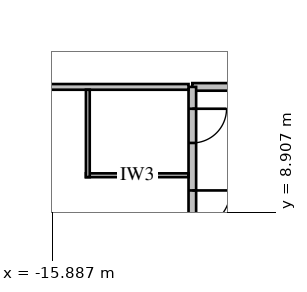
"""IFC4 building model, lengths in metres.
Left out: names, types, materials, properties, quantities, classifications, styles, units other than length and angle.
Written with IfcOpenShell. Run it as: python <this file> out.ifc"""

import sys

from ifc_helpers import new_model, si_unit, direction, frame, frame_2d, origin, place, context, subcontext, project, spatial, rectangle, extrude, element, fill, save


model = new_model("IFC4")
c1 = context("Model", 3, precision=1e-05, world=origin(), true_north=direction((0.0, 1.0)))
c2 = subcontext(c1, "Body", "Model", "MODEL_VIEW")
j1 = project(units=[si_unit("LENGTHUNIT", "METRE"), si_unit("PLANEANGLEUNIT", "RADIAN")], contexts=[c1])
p1 = place(None, origin())
s1 = spatial("IfcSite", under=j1, at=p1, CompositionType="ELEMENT")
p2 = place(p1, origin())
s2 = spatial("IfcBuilding", under=s1, at=p2, CompositionType="ELEMENT")
p3 = place(p2, frame((0.0, 0.0, 6.0)))
s3 = spatial("IfcBuildingStorey", under=s2, at=p3, CompositionType="ELEMENT", Elevation=6.0)
p4 = place(p3, frame((12.2, 12.2, 0.0), z_axis=(0.0, 0.0, 1.0), x_axis=(-1.0, 0.0, 0.0)))
e1 = element("IfcWall", 1, at=p4, inside=s3, PredefinedType="PARTITIONING", context=c2, shape_type="SweptSolid", body=[
    extrude(rectangle(XDim=24.4, YDim=0.2, at=frame_2d((12.2, 0.0))), origin(), (0.0, 0.0, 1.0), 4.188),
])
p5 = place(p4, frame((1.6, 0.0, 0.0)))
e2 = element("IfcOpeningElement", 2, at=p5, cuts=e1, PredefinedType="OPENING", context=c2, shape_type="SweptSolid", body=[
    extrude(rectangle(XDim=1.0, YDim=2.1, at=frame_2d((0.5, 1.05))), frame((0.0, 0.12, 0.0), z_axis=(0.0, -1.0, 0.0), x_axis=(1.0, 0.0, 0.0)), (0.0, 0.0, 1.0), 0.24),
])
p6 = place(p4, frame((5.408, 0.0, 0.0)))
e3 = element("IfcOpeningElement", 3, at=p6, cuts=e1, PredefinedType="OPENING", context=c2, shape_type="SweptSolid", body=[
    extrude(rectangle(XDim=1.0, YDim=2.1, at=frame_2d((0.5, 1.05))), frame((0.0, 0.12, 0.0), z_axis=(0.0, -1.0, 0.0), x_axis=(1.0, 0.0, 0.0)), (0.0, 0.0, 1.0), 0.24),
])
p7 = place(p4, frame((9.408, 0.0, 0.0)))
e4 = element("IfcOpeningElement", 4, at=p7, cuts=e1, PredefinedType="OPENING", context=c2, shape_type="SweptSolid", body=[
    extrude(rectangle(XDim=1.0, YDim=2.1, at=frame_2d((0.5, 1.05))), frame((0.0, 0.12, 0.0), z_axis=(0.0, -1.0, 0.0), x_axis=(1.0, 0.0, 0.0)), (0.0, 0.0, 1.0), 0.24),
])
p8 = place(p4, frame((17.4, 0.0, 0.0)))
e5 = element("IfcOpeningElement", 5, at=p8, cuts=e1, PredefinedType="OPENING", context=c2, shape_type="SweptSolid", body=[
    extrude(rectangle(XDim=1.8, YDim=2.4, at=frame_2d((0.9, 1.2))), frame((0.0, 0.12, 0.0), z_axis=(0.0, -1.0, 0.0), x_axis=(1.0, 0.0, 0.0)), (0.0, 0.0, 1.0), 0.24),
])
p9 = place(p3, frame((-12.2, 12.2, 0.0), z_axis=(0.0, 0.0, 1.0), x_axis=(0.0, -1.0, 0.0)))
e6 = element("IfcWall", 6, at=p9, inside=s3, PredefinedType="PARTITIONING", context=c2, shape_type="SweptSolid", body=[
    extrude(rectangle(XDim=24.4, YDim=0.2, at=frame_2d((12.2, 0.0))), origin(), (0.0, 0.0, 1.0), 4.8),
])
p10 = place(p9, frame((0.575, 0.0, 0.0)))
e7 = element("IfcOpeningElement", 7, at=p10, cuts=e6, PredefinedType="OPENING", context=c2, shape_type="SweptSolid", body=[
    extrude(rectangle(XDim=0.9, YDim=2.1, at=frame_2d((0.45, 1.05))), frame((0.0, 0.12, 0.0), z_axis=(0.0, -1.0, 0.0), x_axis=(1.0, 0.0, 0.0)), (0.0, 0.0, 1.0), 0.24),
])
p11 = place(p9, frame((2.725, 0.0, 0.0)))
e8 = element("IfcOpeningElement", 8, at=p11, cuts=e6, PredefinedType="OPENING", context=c2, shape_type="SweptSolid", body=[
    extrude(rectangle(XDim=1.0, YDim=2.1, at=frame_2d((0.5, 1.05))), frame((0.0, 0.12, 0.0), z_axis=(0.0, -1.0, 0.0), x_axis=(1.0, 0.0, 0.0)), (0.0, 0.0, 1.0), 0.24),
])
p12 = place(p9, frame((7.7, 0.0, 0.0)))
e9 = element("IfcOpeningElement", 9, at=p12, cuts=e6, PredefinedType="OPENING", context=c2, shape_type="SweptSolid", body=[
    extrude(rectangle(XDim=1.0, YDim=2.1, at=frame_2d((0.5, 1.05))), frame((0.0, 0.12, 0.0), z_axis=(0.0, -1.0, 0.0), x_axis=(1.0, 0.0, 0.0)), (0.0, 0.0, 1.0), 0.24),
])
p13 = place(p9, frame((17.4, 0.0, 0.0)))
e10 = element("IfcOpeningElement", 10, at=p13, cuts=e6, PredefinedType="OPENING", context=c2, shape_type="SweptSolid", body=[
    extrude(rectangle(XDim=1.8, YDim=2.4, at=frame_2d((0.9, 1.2))), frame((0.0, 0.12, 0.0), z_axis=(0.0, -1.0, 0.0), x_axis=(1.0, 0.0, 0.0)), (0.0, 0.0, 1.0), 0.24),
])
p14 = place(p3, frame((-12.3, 12.2, 0.0), z_axis=(0.0, 0.0, 1.0), x_axis=(-1.0, 0.0, 0.0)))
e11 = element("IfcWall", 11, at=p14, inside=s3, PredefinedType="PARTITIONING", context=c2, shape_type="SweptSolid", body=[
    extrude(rectangle(XDim=15.55, YDim=0.15, at=frame_2d((7.775, 0.0))), origin(), (0.0, 0.0, 1.0), 4.188),
])
p15 = place(p3, frame((-12.3, 9.875, 0.0), z_axis=(0.0, 0.0, 1.0), x_axis=(-1.0, 0.0, 0.0)))
e12 = element("IfcWall", 12, at=p15, inside=s3, PredefinedType="PARTITIONING", context=c2, shape_type="SweptSolid", body=[
    extrude(rectangle(XDim=2.7, YDim=0.1, at=frame_2d((1.35, 0.0))), origin(), (0.0, 0.0, 1.0), 4.8),
])
p16 = place(p3, frame((-14.95, 12.125, 0.0), z_axis=(0.0, 0.0, 1.0), x_axis=(0.0, -1.0, 0.0)))
e13 = element("IfcWall", 13, at=p16, inside=s3, PredefinedType="PARTITIONING", context=c2, shape_type="SweptSolid", body=[
    extrude(rectangle(XDim=2.3, YDim=0.1, at=frame_2d((1.15, 0.0))), origin(), (0.0, 0.0, 1.0), 4.8),
])
p17 = place(p10, origin())
e14 = element("IfcDoor", 14, at=p17, inside=s3, OperationType="SINGLE_SWING_LEFT", PredefinedType="DOOR", context=c2, shape_type="SweptSolid", body=[
    extrude(rectangle(XDim=0.9, YDim=2.1, at=frame_2d((0.45, 1.05))), frame((0.0, 0.025, 0.0), z_axis=(0.0, -1.0, 0.0), x_axis=(1.0, 0.0, 0.0)), (0.0, 0.0, 1.0), 0.05),
])
fill(e7, e14)
p18 = place(p11, origin())
e15 = element("IfcDoor", 15, at=p18, inside=s3, OperationType="SINGLE_SWING_LEFT", PredefinedType="DOOR", context=c2, shape_type="SweptSolid", body=[
    extrude(rectangle(XDim=1.0, YDim=2.1, at=frame_2d((0.5, 1.05))), frame((0.0, 0.025, 0.0), z_axis=(0.0, -1.0, 0.0), x_axis=(1.0, 0.0, 0.0)), (0.0, 0.0, 1.0), 0.05),
])
fill(e8, e15)
save(model, sys.argv[1])
